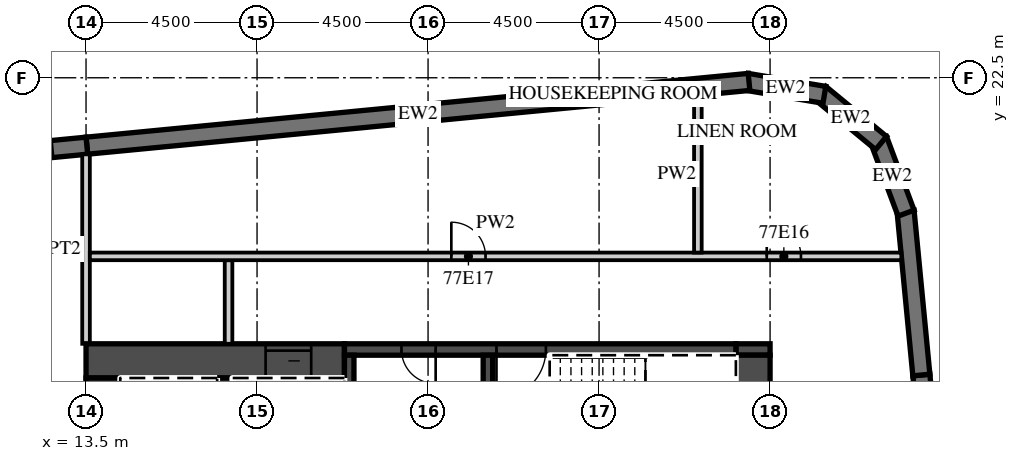
"""IFC4 building model, lengths in metres.
Left out: names, types, materials, properties, quantities, classifications, styles, units other than length and angle.
Written with IfcOpenShell. Run it as: python <this file> out.ifc"""

import sys

from ifc_helpers import new_model, si_unit, direction, frame, frame_2d, origin, place, context, subcontext, project, spatial, polyline, rectangle, outline, extrude, element, fill, save


model = new_model("IFC4")
c1 = context("Model", 3, precision=1e-05, world=origin(), true_north=direction((0.0, 1.0)))
c2 = subcontext(c1, "Body", "Model", "MODEL_VIEW")
j1 = project(units=[si_unit("LENGTHUNIT", "METRE"), si_unit("PLANEANGLEUNIT", "RADIAN")], contexts=[c1])
p1 = place(None, origin())
s1 = spatial("IfcSite", under=j1, at=p1, CompositionType="ELEMENT")
p2 = place(p1, origin())
s2 = spatial("IfcBuilding", under=s1, at=p2, CompositionType="ELEMENT")
p3 = place(p2, frame((0.0, 0.0, 304.8)))
s3 = spatial("IfcBuildingStorey", under=s2, at=p3, CompositionType="ELEMENT", Elevation=304.8)
p4 = place(p3, frame((35.914, 10.178, 0.0), z_axis=(0.0, 0.0, 1.0), x_axis=(-0.09580296028, 0.995400317863, 0.0)))
e1 = element("IfcWall", 1, at=p4, inside=s3, PredefinedType="SOLIDWALL", context=c2, shape_type="SweptSolid", body=[
    extrude(rectangle(XDim=4.521, YDim=0.45, at=frame_2d((2.26, 0.0))), origin(), (0.0, 0.0, 1.0), 2.9),
])
p5 = place(p3, frame((35.481, 14.678, 0.0), z_axis=(0.0, 0.0, 1.0), x_axis=(-0.095879759522, 0.995392923279, 0.0)))
e2 = element("IfcWall", 2, at=p5, inside=s3, PredefinedType="SOLIDWALL", context=c2, shape_type="SweptSolid", body=[
    extrude(rectangle(XDim=4.336, YDim=0.45, at=frame_2d((2.168, 0.0))), origin(), (0.0, 0.0, 1.0), 2.9),
])
p6 = place(p3, frame((35.078, 18.938, 0.0), z_axis=(0.0, 0.0, 1.0), x_axis=(-0.350192909346, 0.936677599948, 0.0)))
e3 = element("IfcWall", 3, at=p6, inside=s3, PredefinedType="SOLIDWALL", context=c2, shape_type="SweptSolid", body=[
    extrude(outline(polyline([(0.0, -0.225), (2.071, -0.225), (1.95, 0.225), (0.121, 0.225), (0.0, -0.225)])), origin(), (0.0, 0.0, 1.0), 2.9),
])
p7 = place(p3, frame((34.421, 20.782, 0.0), z_axis=(0.0, 0.0, 1.0), x_axis=(-0.771593176315, 0.636116318187, 0.0)))
e4 = element("IfcWall", 4, at=p7, inside=s3, PredefinedType="SOLIDWALL", context=c2, shape_type="SweptSolid", body=[
    extrude(outline(polyline([(0.0, -0.225), (2.071, -0.225), (1.95, 0.225), (0.12, 0.225), (0.0, -0.225)])), origin(), (0.0, 0.0, 1.0), 2.9),
])
p8 = place(p3, frame((32.929, 22.051, 0.0), z_axis=(0.0, 0.0, 1.0), x_axis=(-0.986298144721, 0.164972633245, 0.0)))
e5 = element("IfcWall", 5, at=p8, inside=s3, PredefinedType="SOLIDWALL", context=c2, shape_type="SweptSolid", body=[
    extrude(outline(polyline([(0.0, -0.225), (2.07, -0.225), (1.95, 0.225), (0.121, 0.225), (0.0, -0.225)])), origin(), (0.0, 0.0, 1.0), 2.9),
])
p9 = place(p3, frame((30.946, 22.391, 0.0), z_axis=(0.0, 0.0, 1.0), x_axis=(-0.995396397117, -0.095843688398, 0.0)))
e6 = element("IfcWall", 6, at=p9, inside=s3, PredefinedType="SOLIDWALL", context=c2, shape_type="SweptSolid", body=[
    extrude(rectangle(XDim=17.505, YDim=0.45, at=frame_2d((8.752, 0.0))), origin(), (0.0, 0.0, 1.0), 2.9),
])
p10 = place(p3, frame((13.521, 20.713, 0.0), z_axis=(0.0, 0.0, 1.0), x_axis=(-0.995395166513, -0.095856468129, 0.0)))
e7 = element("IfcWall", 7, at=p10, inside=s3, PredefinedType="SOLIDWALL", context=c2, shape_type="SweptSolid", body=[
    extrude(rectangle(XDim=4.521, YDim=0.45, at=frame_2d((2.26, 0.0))), origin(), (0.0, 0.0, 1.0), 2.9),
])
p11 = place(p10, frame((0.91, 0.0, 0.45)))
e8 = element("IfcOpeningElement", 8, at=p11, cuts=e7, PredefinedType="OPENING", context=c2, shape_type="SweptSolid", body=[
    extrude(rectangle(XDim=2.7, YDim=2.25, at=frame_2d((1.35, 1.125))), frame((0.0, 0.235, 0.0), z_axis=(0.0, -1.0, 0.0), x_axis=(1.0, 0.0, 0.0)), (0.0, 0.0, 1.0), 0.47),
])
p12 = place(p3, frame((13.5, 15.5, 0.0), z_axis=(0.0, 0.0, 1.0), x_axis=(0.0, 1.0, 0.0)))
e9 = element("IfcWall", 9, at=p12, inside=s3, PredefinedType="PARTITIONING", context=c2, shape_type="SweptSolid", body=[
    extrude(rectangle(XDim=4.985, YDim=0.2, at=frame_2d((2.493, 0.0))), origin(), (0.0, 0.0, 1.0), 2.9),
])
p13 = place(p3, frame((13.5, 15.05, 0.0), z_axis=(0.0, 0.0, 1.0), x_axis=(1.0, 0.0, 0.0)))
e10 = element("IfcWall", 10, at=p13, inside=s3, PredefinedType="SHEAR", context=c2, shape_type="SweptSolid", body=[
    extrude(rectangle(XDim=6.8, YDim=0.9, at=frame_2d((3.4, 0.0))), origin(), (0.0, 0.0, 1.0), 2.9),
])
p14 = place(p13, frame((4.725, 0.0, 0.0)))
e11 = element("IfcOpeningElement", 11, at=p14, cuts=e10, PredefinedType="OPENING", context=c2, shape_type="SweptSolid", body=[
    extrude(rectangle(XDim=1.2, YDim=2.1, at=frame_2d((0.6, 1.05))), frame((0.0, 0.46, 0.0), z_axis=(0.0, -1.0, 0.0), x_axis=(1.0, 0.0, 0.0)), (0.0, 0.0, 1.0), 0.92),
])
p15 = place(p3, frame((30.6, 15.35, 0.0), z_axis=(0.0, 0.0, 1.0), x_axis=(1.0, 0.0, 0.0)))
e12 = element("IfcWall", 12, at=p15, inside=s3, PredefinedType="SHEAR", context=c2, shape_type="SweptSolid", body=[
    extrude(rectangle(XDim=0.9, YDim=0.3, at=frame_2d((0.45, 0.0))), origin(), (0.0, 0.0, 1.0), 2.9),
])
p16 = place(p3, frame((20.3, 15.35, 0.0), z_axis=(0.0, 0.0, 1.0), x_axis=(1.0, 0.0, 0.0)))
e13 = element("IfcWall", 13, at=p16, inside=s3, PredefinedType="SHEAR", context=c2, shape_type="SweptSolid", body=[
    extrude(rectangle(XDim=10.3, YDim=0.3, at=frame_2d((5.15, 0.0))), origin(), (0.0, 0.0, 1.0), 2.9),
])
p17 = place(p16, frame((4.0, 0.0, 0.0)))
e14 = element("IfcOpeningElement", 14, at=p17, cuts=e13, PredefinedType="OPENING", context=c2, shape_type="SweptSolid", body=[
    extrude(rectangle(XDim=1.3, YDim=2.1, at=frame_2d((0.65, 1.05))), frame((0.0, 0.16, 0.0), z_axis=(0.0, -1.0, 0.0), x_axis=(1.0, 0.0, 0.0)), (0.0, 0.0, 1.0), 0.32),
])
p18 = place(p16, frame((1.5, 0.0, 0.0)))
e15 = element("IfcOpeningElement", 15, at=p18, cuts=e13, PredefinedType="OPENING", context=c2, shape_type="SweptSolid", body=[
    extrude(rectangle(XDim=0.9, YDim=2.1, at=frame_2d((0.45, 1.05))), frame((0.0, 0.16, 0.0), z_axis=(0.0, -1.0, 0.0), x_axis=(1.0, 0.0, 0.0)), (0.0, 0.0, 1.0), 0.32),
])
p19 = place(p3, frame((31.05, 2.4, 0.0), z_axis=(0.0, 0.0, 1.0), x_axis=(0.0, 1.0, 0.0)))
e16 = element("IfcWall", 16, at=p19, inside=s3, PredefinedType="SHEAR", context=c2, shape_type="SweptSolid", body=[
    extrude(rectangle(XDim=12.8, YDim=0.9, at=frame_2d((6.4, 0.0))), origin(), (0.0, 0.0, 1.0), 2.9),
])
p20 = place(p19, frame((0.2, 0.0, 0.0)))
e17 = element("IfcOpeningElement", 17, at=p20, cuts=e16, PredefinedType="OPENING", context=c2, shape_type="SweptSolid", body=[
    extrude(rectangle(XDim=1.1, YDim=2.1, at=frame_2d((0.55, 1.05))), frame((0.0, 0.46, 0.0), z_axis=(0.0, -1.0, 0.0), x_axis=(1.0, 0.0, 0.0)), (0.0, 0.0, 1.0), 0.92),
])
p21 = place(p3, frame((13.95, 2.4, 0.0), z_axis=(0.0, 0.0, 1.0), x_axis=(0.0, 1.0, 0.0)))
e18 = element("IfcWall", 18, at=p21, inside=s3, PredefinedType="SHEAR", context=c2, shape_type="SweptSolid", body=[
    extrude(rectangle(XDim=12.2, YDim=0.9, at=frame_2d((6.1, 0.0))), origin(), (0.0, 0.0, 1.0), 2.9),
])
p22 = place(p3, frame((17.15, 8.8, 0.0), z_axis=(0.0, 0.0, 1.0), x_axis=(0.0, 1.0, 0.0)))
e19 = element("IfcWall", 19, at=p22, inside=s3, PredefinedType="SHEAR", context=c2, shape_type="SweptSolid", body=[
    extrude(rectangle(XDim=5.8, YDim=0.4, at=frame_2d((2.9, 0.0))), origin(), (0.0, 0.0, 1.0), 2.9),
])
for number, where, z_axis, x_axis in (
    (20, (20.425, 11.95, 0.0), (0.0, 0.0, 1.0), (0.0, 1.0, 0.0)),
    (21, (24.075, 11.95, 0.0), (0.0, 0.0, 1.0), (0.0, 1.0, 0.0)),
):
    element("IfcWall", number, at=place(p3, frame(where, z_axis=z_axis, x_axis=x_axis)), inside=s3, PredefinedType="SHEAR", context=c2, shape_type="SweptSolid", body=[
        extrude(rectangle(XDim=3.25, YDim=0.25, at=frame_2d((1.625, 0.0))), origin(), (0.0, 0.0, 1.0), 2.9),
    ])
p23 = place(p3, frame((17.25, 15.5, 0.0), z_axis=(0.0, 0.0, 1.0), x_axis=(0.0, 1.0, 0.0)))
e22 = element("IfcWall", 22, at=p23, inside=s3, PredefinedType="PARTITIONING", context=c2, shape_type="SweptSolid", body=[
    extrude(rectangle(XDim=2.2, YDim=0.2, at=frame_2d((1.1, 0.0))), origin(), (0.0, 0.0, 1.0), 2.9),
])
p24 = place(p3, frame((13.6, 17.8, 0.0), z_axis=(0.0, 0.0, 1.0), x_axis=(1.0, 0.0, 0.0)))
e23 = element("IfcWall", 23, at=p24, inside=s3, PredefinedType="PARTITIONING", context=c2, shape_type="SweptSolid", body=[
    extrude(rectangle(XDim=21.354, YDim=0.2, at=frame_2d((10.677, 0.0))), origin(), (0.0, 0.0, 1.0), 2.9),
])
p25 = place(p24, frame((17.812, 0.0, 0.0)))
e24 = element("IfcOpeningElement", 24, at=p25, cuts=e23, PredefinedType="OPENING", context=c2, shape_type="SweptSolid", body=[
    extrude(rectangle(XDim=0.9, YDim=2.1, at=frame_2d((0.45, 1.05))), frame((0.0, 0.11, 0.0), z_axis=(0.0, -1.0, 0.0), x_axis=(1.0, 0.0, 0.0)), (0.0, 0.0, 1.0), 0.22),
])
p26 = place(p24, frame((9.512, 0.0, 0.0)))
e25 = element("IfcOpeningElement", 25, at=p26, cuts=e23, PredefinedType="OPENING", context=c2, shape_type="SweptSolid", body=[
    extrude(rectangle(XDim=0.9, YDim=2.1, at=frame_2d((0.45, 1.05))), frame((0.0, 0.11, 0.0), z_axis=(0.0, -1.0, 0.0), x_axis=(1.0, 0.0, 0.0)), (0.0, 0.0, 1.0), 0.22),
])
p27 = place(p3, frame((29.6, 17.9, 0.0), z_axis=(0.0, 0.0, 1.0), x_axis=(0.0, 1.0, 0.0)))
e26 = element("IfcWall", 26, at=p27, inside=s3, PredefinedType="PARTITIONING", context=c2, shape_type="SweptSolid", body=[
    extrude(rectangle(XDim=4.136, YDim=0.2, at=frame_2d((2.068, 0.0))), origin(), (0.0, 0.0, 1.0), 2.9),
])
p28 = place(p11, origin())
e27 = element("IfcWindow", 27, at=p28, inside=s3, PartitioningType="SINGLE_PANEL", PredefinedType="WINDOW", context=c2, shape_type="SweptSolid", body=[
    extrude(rectangle(XDim=2.7, YDim=2.25, at=frame_2d((1.35, 1.125))), frame((0.0, 0.09, 0.0), z_axis=(0.0, -1.0, 0.0), x_axis=(1.0, 0.0, 0.0)), (0.0, 0.0, 1.0), 0.06),
])
fill(e8, e27)
p29 = place(p14, origin())
e28 = element("IfcDoor", 28, at=p29, inside=s3, OperationType="SLIDING_TO_LEFT", PredefinedType="DOOR", context=c2, shape_type="SweptSolid", body=[
    extrude(rectangle(XDim=1.2, YDim=2.1, at=frame_2d((0.6, 1.05))), frame((0.0, 0.025, 0.0), z_axis=(0.0, -1.0, 0.0), x_axis=(1.0, 0.0, 0.0)), (0.0, 0.0, 1.0), 0.05),
])
fill(e11, e28)
p30 = place(p17, origin())
e29 = element("IfcDoor", 29, at=p30, inside=s3, OperationType="SINGLE_SWING_LEFT", PredefinedType="DOOR", context=c2, shape_type="SweptSolid", body=[
    extrude(rectangle(XDim=1.3, YDim=2.1, at=frame_2d((0.65, 1.05))), frame((0.0, 0.025, 0.0), z_axis=(0.0, -1.0, 0.0), x_axis=(1.0, 0.0, 0.0)), (0.0, 0.0, 1.0), 0.05),
])
fill(e14, e29)
p31 = place(p18, origin())
e30 = element("IfcDoor", 30, at=p31, inside=s3, OperationType="SINGLE_SWING_RIGHT", PredefinedType="DOOR", context=c2, shape_type="SweptSolid", body=[
    extrude(rectangle(XDim=0.9, YDim=2.1, at=frame_2d((0.45, 1.05))), frame((0.0, 0.025, 0.0), z_axis=(0.0, -1.0, 0.0), x_axis=(1.0, 0.0, 0.0)), (0.0, 0.0, 1.0), 0.05),
])
fill(e15, e30)
p32 = place(p25, origin())
e31 = element("IfcDoor", 31, at=p32, inside=s3, OperationType="SINGLE_SWING_LEFT", PredefinedType="DOOR", context=c2, shape_type="SweptSolid", body=[
    extrude(rectangle(XDim=0.9, YDim=2.1, at=frame_2d((0.45, 1.05))), frame((0.0, 0.025, 0.0), z_axis=(0.0, -1.0, 0.0), x_axis=(1.0, 0.0, 0.0)), (0.0, 0.0, 1.0), 0.05),
])
fill(e24, e31)
p33 = place(p26, origin())
e32 = element("IfcDoor", 32, at=p33, inside=s3, OperationType="SINGLE_SWING_LEFT", PredefinedType="DOOR", context=c2, shape_type="SweptSolid", body=[
    extrude(rectangle(XDim=0.9, YDim=2.1, at=frame_2d((0.45, 1.05))), frame((0.0, 0.025, 0.0), z_axis=(0.0, -1.0, 0.0), x_axis=(1.0, 0.0, 0.0)), (0.0, 0.0, 1.0), 0.05),
])
fill(e25, e32)
save(model, sys.argv[1])
